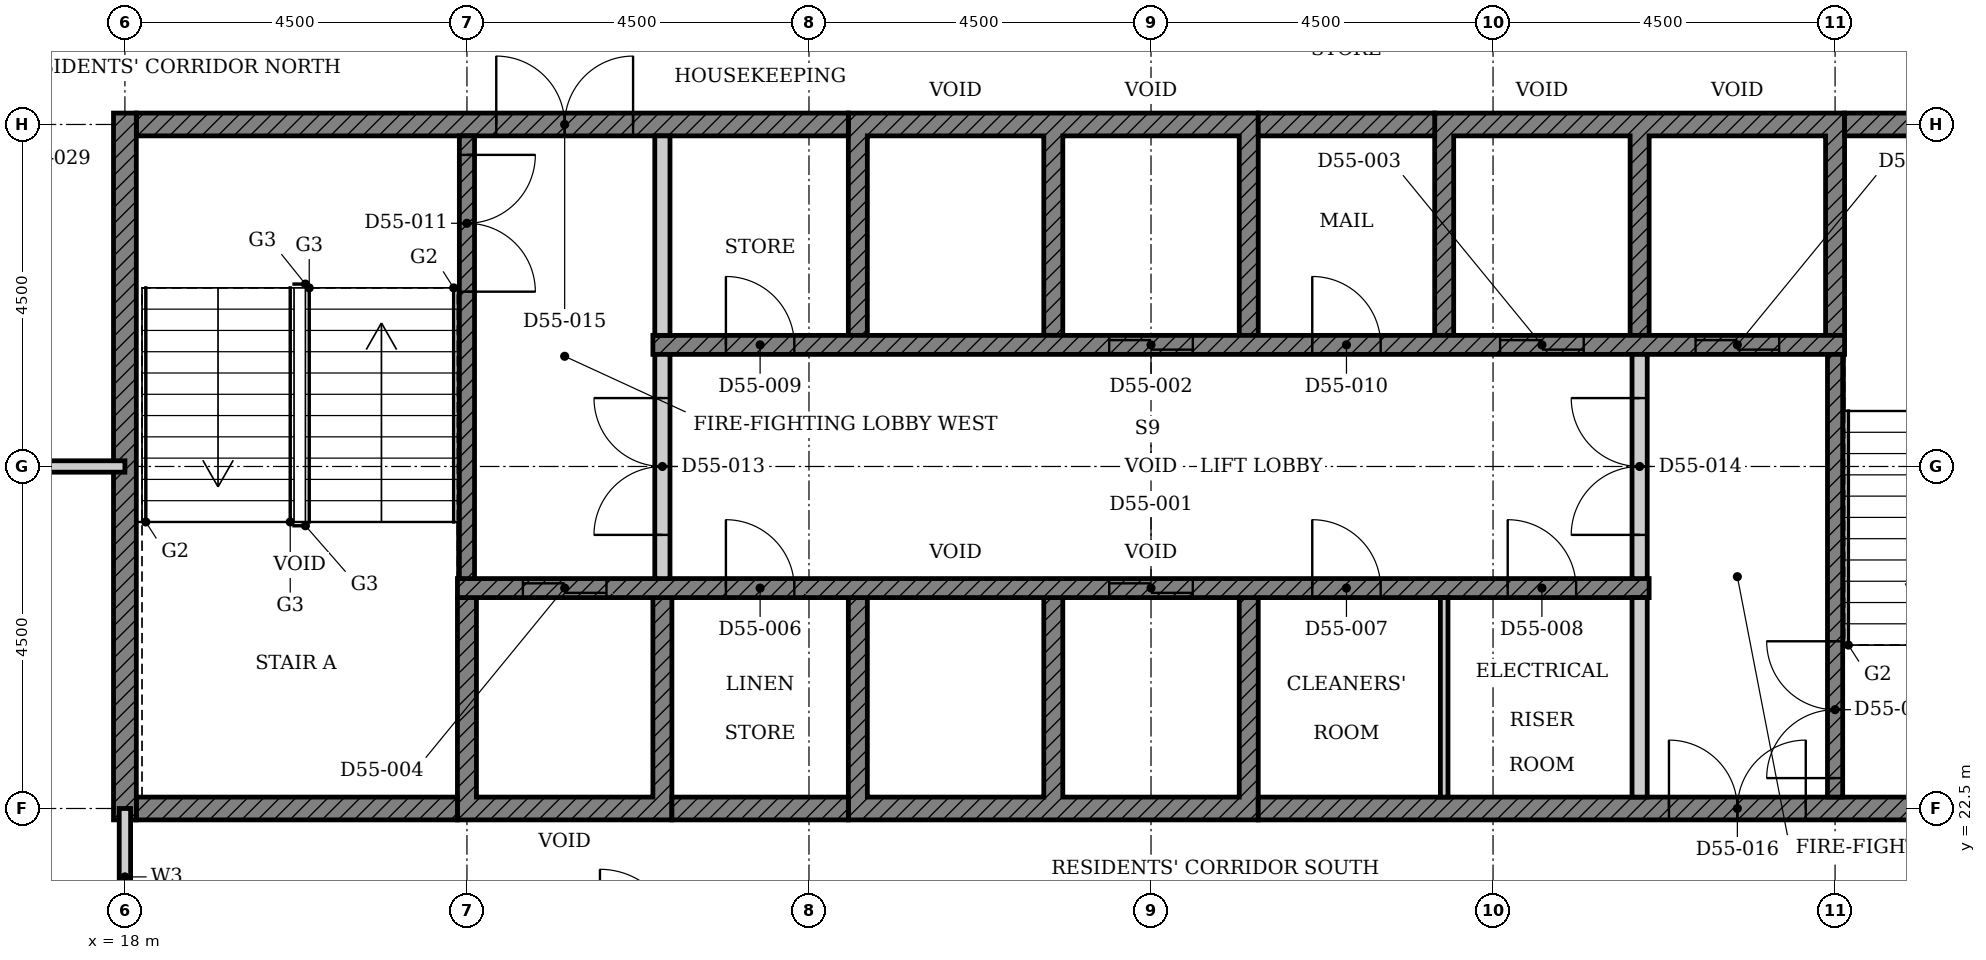
"""IFC4 building model, lengths in metres.
Left out: names, types, materials, properties, quantities, classifications, styles, units other than length and angle.
Written with IfcOpenShell. Run it as: python <this file> out.ifc"""

import sys

from ifc_helpers import new_model, si_unit, direction, frame, frame_2d, origin, place, context, subcontext, project, spatial, polyline, rectangle, outline, extrude, element, fill, save


model = new_model("IFC4")
c1 = context("Model", 3, precision=1e-05, world=origin(), true_north=direction((0.0, 1.0)))
c2 = subcontext(c1, "Body", "Model", "MODEL_VIEW")
j1 = project(units=[si_unit("LENGTHUNIT", "METRE"), si_unit("PLANEANGLEUNIT", "RADIAN")], contexts=[c1])
p1 = place(None, origin())
s1 = spatial("IfcSite", under=j1, at=p1, CompositionType="ELEMENT")
p2 = place(p1, origin())
s2 = spatial("IfcBuilding", under=s1, at=p2, CompositionType="ELEMENT")
p3 = place(p2, frame((0.0, 0.0, 218.3)))
s3 = spatial("IfcBuildingStorey", under=s2, at=p3, CompositionType="ELEMENT", Elevation=218.3)
p4 = place(p3, origin())
e1 = element("IfcWall", 1, at=p4, inside=s3, PredefinedType="SHEAR", context=c2, shape_type="SweptSolid", body=[
    extrude(outline(polyline([(22.375, 22.35), (25.197, 22.35), (25.197, 25.275), (24.947, 25.275), (24.947, 22.65), (22.625, 22.65), (22.625, 25.275), (22.375, 25.275), (22.375, 22.35)])), origin(), (0.0, 0.0, 1.0), 3.4),
])
p5 = place(p3, origin())
e2 = element("IfcWall", 2, at=p5, inside=s3, PredefinedType="SHEAR", context=c2, shape_type="SweptSolid", body=[
    extrude(outline(polyline([(27.518, 22.35), (32.911, 22.35), (32.911, 25.275), (32.661, 25.275), (32.661, 22.65), (30.339, 22.65), (30.339, 25.275), (30.089, 25.275), (30.089, 22.65), (27.768, 22.65), (27.768, 25.275), (27.518, 25.275), (27.518, 22.35)])), origin(), (0.0, 0.0, 1.0), 3.4),
])
p6 = place(p3, origin())
e3 = element("IfcWall", 3, at=p6, inside=s3, PredefinedType="SHEAR", context=c2, shape_type="SweptSolid", body=[
    extrude(outline(polyline([(27.518, 28.725), (27.768, 28.725), (27.768, 31.35), (30.089, 31.35), (30.089, 28.725), (30.339, 28.725), (30.339, 31.35), (32.661, 31.35), (32.661, 28.725), (32.911, 28.725), (32.911, 31.65), (27.518, 31.65), (27.518, 28.725)])), origin(), (0.0, 0.0, 1.0), 3.4),
])
p7 = place(p3, origin())
e4 = element("IfcWall", 4, at=p7, inside=s3, PredefinedType="SHEAR", context=c2, shape_type="SweptSolid", body=[
    extrude(outline(polyline([(35.232, 28.725), (35.482, 28.725), (35.482, 31.35), (37.803, 31.35), (37.803, 28.725), (38.053, 28.725), (38.053, 31.35), (40.375, 31.35), (40.375, 28.725), (40.625, 28.725), (40.625, 31.65), (35.232, 31.65), (35.232, 28.725)])), origin(), (0.0, 0.0, 1.0), 3.4),
])
p8 = place(p3, frame((18.15, 22.5, 0.0), z_axis=(0.0, 0.0, 1.0), x_axis=(1.0, 0.0, 0.0)))
e5 = element("IfcWall", 5, at=p8, inside=s3, PredefinedType="SHEAR", context=c2, shape_type="SweptSolid", body=[
    extrude(rectangle(XDim=4.225, YDim=0.3, at=frame_2d((2.113, 0.0))), origin(), (0.0, 0.0, 1.0), 3.4),
])
p9 = place(p3, frame((25.197, 22.5, 0.0), z_axis=(0.0, 0.0, 1.0), x_axis=(1.0, 0.0, 0.0)))
e6 = element("IfcWall", 6, at=p9, inside=s3, PredefinedType="SHEAR", context=c2, shape_type="SweptSolid", body=[
    extrude(rectangle(XDim=2.321, YDim=0.3, at=frame_2d((1.161, 0.0))), origin(), (0.0, 0.0, 1.0), 3.4),
])
p10 = place(p3, frame((32.911, 22.5, 0.0), z_axis=(0.0, 0.0, 1.0), x_axis=(1.0, 0.0, 0.0)))
e7 = element("IfcWall", 7, at=p10, inside=s3, PredefinedType="SHEAR", context=c2, shape_type="SweptSolid", body=[
    extrude(rectangle(XDim=11.939, YDim=0.3, at=frame_2d((5.97, 0.0))), origin(), (0.0, 0.0, 1.0), 3.4),
])
p11 = place(p10, frame((5.404, 0.0, 0.0)))
e8 = element("IfcOpeningElement", 8, at=p11, cuts=e7, PredefinedType="OPENING", context=c2, shape_type="SweptSolid", body=[
    extrude(rectangle(XDim=1.8, YDim=2.1, at=frame_2d((0.9, 1.05))), frame((0.0, 0.16, 0.0), z_axis=(0.0, -1.0, 0.0), x_axis=(1.0, 0.0, 0.0)), (0.0, 0.0, 1.0), 0.32),
])
p12 = place(p3, frame((18.15, 31.5, 0.0), z_axis=(0.0, 0.0, 1.0), x_axis=(1.0, 0.0, 0.0)))
e9 = element("IfcWall", 9, at=p12, inside=s3, PredefinedType="SHEAR", context=c2, shape_type="SweptSolid", body=[
    extrude(rectangle(XDim=9.368, YDim=0.3, at=frame_2d((4.684, 0.0))), origin(), (0.0, 0.0, 1.0), 3.4),
])
p13 = place(p12, frame((4.736, 0.0, 0.0)))
e10 = element("IfcOpeningElement", 10, at=p13, cuts=e9, PredefinedType="OPENING", context=c2, shape_type="SweptSolid", body=[
    extrude(rectangle(XDim=1.8, YDim=2.1, at=frame_2d((0.9, 1.05))), frame((0.0, 0.16, 0.0), z_axis=(0.0, -1.0, 0.0), x_axis=(1.0, 0.0, 0.0)), (0.0, 0.0, 1.0), 0.32),
])
p14 = place(p3, frame((32.911, 31.5, 0.0), z_axis=(0.0, 0.0, 1.0), x_axis=(1.0, 0.0, 0.0)))
e11 = element("IfcWall", 11, at=p14, inside=s3, PredefinedType="SHEAR", context=c2, shape_type="SweptSolid", body=[
    extrude(rectangle(XDim=2.322, YDim=0.3, at=frame_2d((1.161, 0.0))), origin(), (0.0, 0.0, 1.0), 3.4),
])
p15 = place(p3, frame((40.625, 31.5, 0.0), z_axis=(0.0, 0.0, 1.0), x_axis=(1.0, 0.0, 0.0)))
e12 = element("IfcWall", 12, at=p15, inside=s3, PredefinedType="SHEAR", context=c2, shape_type="SweptSolid", body=[
    extrude(rectangle(XDim=4.225, YDim=0.3, at=frame_2d((2.113, 0.0))), origin(), (0.0, 0.0, 1.0), 3.4),
])
p16 = place(p3, frame((18.0, 22.35, 0.0), z_axis=(0.0, 0.0, 1.0), x_axis=(0.0, 1.0, 0.0)))
e13 = element("IfcWall", 13, at=p16, inside=s3, PredefinedType="SHEAR", context=c2, shape_type="SweptSolid", body=[
    extrude(rectangle(XDim=9.3, YDim=0.3, at=frame_2d((4.65, 0.0))), origin(), (0.0, 0.0, 1.0), 3.4),
])
p17 = place(p3, frame((22.375, 25.4, 0.0), z_axis=(0.0, 0.0, 1.0), x_axis=(1.0, 0.0, 0.0)))
e14 = element("IfcWall", 14, at=p17, inside=s3, PredefinedType="SHEAR", context=c2, shape_type="SweptSolid", body=[
    extrude(rectangle(XDim=15.678, YDim=0.25, at=frame_2d((7.839, 0.0))), origin(), (0.0, 0.0, 1.0), 3.4),
])
p18 = place(p17, frame((8.575, 0.0, 0.0)))
e15 = element("IfcOpeningElement", 15, at=p18, cuts=e14, PredefinedType="OPENING", context=c2, shape_type="SweptSolid", body=[
    extrude(rectangle(XDim=1.1, YDim=2.1, at=frame_2d((0.55, 1.05))), frame((0.0, 0.135, 0.0), z_axis=(0.0, -1.0, 0.0), x_axis=(1.0, 0.0, 0.0)), (0.0, 0.0, 1.0), 0.27),
])
p19 = place(p17, frame((0.861, 0.0, 0.0)))
e16 = element("IfcOpeningElement", 16, at=p19, cuts=e14, PredefinedType="OPENING", context=c2, shape_type="SweptSolid", body=[
    extrude(rectangle(XDim=1.1, YDim=2.1, at=frame_2d((0.55, 1.05))), frame((0.0, 0.135, 0.0), z_axis=(0.0, -1.0, 0.0), x_axis=(1.0, 0.0, 0.0)), (0.0, 0.0, 1.0), 0.27),
])
p20 = place(p17, frame((3.532, 0.0, 0.0)))
e17 = element("IfcOpeningElement", 17, at=p20, cuts=e14, PredefinedType="OPENING", context=c2, shape_type="SweptSolid", body=[
    extrude(rectangle(XDim=0.9, YDim=2.1, at=frame_2d((0.45, 1.05))), frame((0.0, 0.135, 0.0), z_axis=(0.0, -1.0, 0.0), x_axis=(1.0, 0.0, 0.0)), (0.0, 0.0, 1.0), 0.27),
])
p21 = place(p17, frame((11.246, 0.0, 0.0)))
e18 = element("IfcOpeningElement", 18, at=p21, cuts=e14, PredefinedType="OPENING", context=c2, shape_type="SweptSolid", body=[
    extrude(rectangle(XDim=0.9, YDim=2.1, at=frame_2d((0.45, 1.05))), frame((0.0, 0.135, 0.0), z_axis=(0.0, -1.0, 0.0), x_axis=(1.0, 0.0, 0.0)), (0.0, 0.0, 1.0), 0.27),
])
p22 = place(p17, frame((13.818, 0.0, 0.0)))
e19 = element("IfcOpeningElement", 19, at=p22, cuts=e14, PredefinedType="OPENING", context=c2, shape_type="SweptSolid", body=[
    extrude(rectangle(XDim=0.9, YDim=2.1, at=frame_2d((0.45, 1.05))), frame((0.0, 0.135, 0.0), z_axis=(0.0, -1.0, 0.0), x_axis=(1.0, 0.0, 0.0)), (0.0, 0.0, 1.0), 0.27),
])
p23 = place(p3, frame((24.947, 28.6, 0.0), z_axis=(0.0, 0.0, 1.0), x_axis=(1.0, 0.0, 0.0)))
e20 = element("IfcWall", 20, at=p23, inside=s3, PredefinedType="SHEAR", context=c2, shape_type="SweptSolid", body=[
    extrude(rectangle(XDim=15.678, YDim=0.25, at=frame_2d((7.839, 0.0))), origin(), (0.0, 0.0, 1.0), 3.4),
])
p24 = place(p23, frame((6.004, 0.0, 0.0)))
e21 = element("IfcOpeningElement", 21, at=p24, cuts=e20, PredefinedType="OPENING", context=c2, shape_type="SweptSolid", body=[
    extrude(rectangle(XDim=1.1, YDim=2.1, at=frame_2d((0.55, 1.05))), frame((0.0, 0.135, 0.0), z_axis=(0.0, -1.0, 0.0), x_axis=(1.0, 0.0, 0.0)), (0.0, 0.0, 1.0), 0.27),
])
p25 = place(p23, frame((11.146, 0.0, 0.0)))
e22 = element("IfcOpeningElement", 22, at=p25, cuts=e20, PredefinedType="OPENING", context=c2, shape_type="SweptSolid", body=[
    extrude(rectangle(XDim=1.1, YDim=2.1, at=frame_2d((0.55, 1.05))), frame((0.0, 0.135, 0.0), z_axis=(0.0, -1.0, 0.0), x_axis=(1.0, 0.0, 0.0)), (0.0, 0.0, 1.0), 0.27),
])
p26 = place(p23, frame((13.718, 0.0, 0.0)))
e23 = element("IfcOpeningElement", 23, at=p26, cuts=e20, PredefinedType="OPENING", context=c2, shape_type="SweptSolid", body=[
    extrude(rectangle(XDim=1.1, YDim=2.1, at=frame_2d((0.55, 1.05))), frame((0.0, 0.135, 0.0), z_axis=(0.0, -1.0, 0.0), x_axis=(1.0, 0.0, 0.0)), (0.0, 0.0, 1.0), 0.27),
])
p27 = place(p23, frame((0.961, 0.0, 0.0)))
e24 = element("IfcOpeningElement", 24, at=p27, cuts=e20, PredefinedType="OPENING", context=c2, shape_type="SweptSolid", body=[
    extrude(rectangle(XDim=0.9, YDim=2.1, at=frame_2d((0.45, 1.05))), frame((0.0, 0.135, 0.0), z_axis=(0.0, -1.0, 0.0), x_axis=(1.0, 0.0, 0.0)), (0.0, 0.0, 1.0), 0.27),
])
p28 = place(p23, frame((8.675, 0.0, 0.0)))
e25 = element("IfcOpeningElement", 25, at=p28, cuts=e20, PredefinedType="OPENING", context=c2, shape_type="SweptSolid", body=[
    extrude(rectangle(XDim=0.9, YDim=2.1, at=frame_2d((0.45, 1.05))), frame((0.0, 0.135, 0.0), z_axis=(0.0, -1.0, 0.0), x_axis=(1.0, 0.0, 0.0)), (0.0, 0.0, 1.0), 0.27),
])
p29 = place(p3, frame((37.928, 22.65, 0.0), z_axis=(0.0, 0.0, 1.0), x_axis=(0.0, 1.0, 0.0)))
e26 = element("IfcWall", 26, at=p29, inside=s3, PredefinedType="PARTITIONING", context=c2, shape_type="SweptSolid", body=[
    extrude(rectangle(XDim=2.625, YDim=0.2, at=frame_2d((1.312, 0.0))), origin(), (0.0, 0.0, 1.0), 3.4),
])
p30 = place(p3, frame((35.357, 22.65, 0.0), z_axis=(0.0, 0.0, 1.0), x_axis=(0.0, 1.0, 0.0)))
e27 = element("IfcWall", 27, at=p30, inside=s3, PredefinedType="PARTITIONING", context=c2, shape_type="SweptSolid", body=[
    extrude(rectangle(XDim=2.625, YDim=0.1, at=frame_2d((1.312, 0.0))), origin(), (0.0, 0.0, 1.0), 3.4),
])
p31 = place(p3, frame((25.072, 28.725, 0.0), z_axis=(0.0, 0.0, 1.0), x_axis=(0.0, 1.0, 0.0)))
e28 = element("IfcWall", 28, at=p31, inside=s3, PredefinedType="PARTITIONING", context=c2, shape_type="SweptSolid", body=[
    extrude(rectangle(XDim=2.625, YDim=0.2, at=frame_2d((1.312, 0.0))), origin(), (0.0, 0.0, 1.0), 3.4),
])
p32 = place(p3, frame((22.5, 31.35, 0.0), z_axis=(0.0, 0.0, 1.0), x_axis=(0.0, -1.0, 0.0)))
e29 = element("IfcWall", 29, at=p32, inside=s3, PredefinedType="SHEAR", context=c2, shape_type="SweptSolid", body=[
    extrude(rectangle(XDim=5.825, YDim=0.2, at=frame_2d((2.913, 0.0))), origin(), (0.0, 0.0, 1.0), 3.4),
])
p33 = place(p32, frame((0.25, 0.0, 0.0)))
e30 = element("IfcOpeningElement", 30, at=p33, cuts=e29, PredefinedType="OPENING", context=c2, shape_type="SweptSolid", body=[
    extrude(rectangle(XDim=1.8, YDim=2.1, at=frame_2d((0.9, 1.05))), frame((0.0, 0.11, 0.0), z_axis=(0.0, -1.0, 0.0), x_axis=(1.0, 0.0, 0.0)), (0.0, 0.0, 1.0), 0.22),
])
p34 = place(p3, frame((40.5, 22.65, 0.0), z_axis=(0.0, 0.0, 1.0), x_axis=(0.0, 1.0, 0.0)))
e31 = element("IfcWall", 31, at=p34, inside=s3, PredefinedType="SHEAR", context=c2, shape_type="SweptSolid", body=[
    extrude(rectangle(XDim=5.825, YDim=0.2, at=frame_2d((2.913, 0.0))), origin(), (0.0, 0.0, 1.0), 3.4),
])
p35 = place(p34, frame((0.25, 0.0, 0.0)))
e32 = element("IfcOpeningElement", 32, at=p35, cuts=e31, PredefinedType="OPENING", context=c2, shape_type="SweptSolid", body=[
    extrude(rectangle(XDim=1.8, YDim=2.1, at=frame_2d((0.9, 1.05))), frame((0.0, 0.11, 0.0), z_axis=(0.0, -1.0, 0.0), x_axis=(1.0, 0.0, 0.0)), (0.0, 0.0, 1.0), 0.22),
])
p36 = place(p3, frame((25.072, 25.525, 0.0), z_axis=(0.0, 0.0, 1.0), x_axis=(0.0, 1.0, 0.0)))
e33 = element("IfcWall", 33, at=p36, inside=s3, PredefinedType="PARTITIONING", context=c2, shape_type="SweptSolid", body=[
    extrude(rectangle(XDim=2.95, YDim=0.2, at=frame_2d((1.475, 0.0))), origin(), (0.0, 0.0, 1.0), 3.4),
])
p37 = place(p36, frame((0.575, 0.0, 0.0)))
e34 = element("IfcOpeningElement", 34, at=p37, cuts=e33, PredefinedType="OPENING", context=c2, shape_type="SweptSolid", body=[
    extrude(rectangle(XDim=1.8, YDim=2.1, at=frame_2d((0.9, 1.05))), frame((0.0, 0.11, 0.0), z_axis=(0.0, -1.0, 0.0), x_axis=(1.0, 0.0, 0.0)), (0.0, 0.0, 1.0), 0.22),
])
p38 = place(p3, frame((37.928, 25.525, 0.0), z_axis=(0.0, 0.0, 1.0), x_axis=(0.0, 1.0, 0.0)))
e35 = element("IfcWall", 35, at=p38, inside=s3, PredefinedType="PARTITIONING", context=c2, shape_type="SweptSolid", body=[
    extrude(rectangle(XDim=2.95, YDim=0.2, at=frame_2d((1.475, 0.0))), origin(), (0.0, 0.0, 1.0), 3.4),
])
p39 = place(p38, frame((0.575, 0.0, 0.0)))
e36 = element("IfcOpeningElement", 36, at=p39, cuts=e35, PredefinedType="OPENING", context=c2, shape_type="SweptSolid", body=[
    extrude(rectangle(XDim=1.8, YDim=2.1, at=frame_2d((0.9, 1.05))), frame((0.0, 0.11, 0.0), z_axis=(0.0, -1.0, 0.0), x_axis=(1.0, 0.0, 0.0)), (0.0, 0.0, 1.0), 0.22),
])
p40 = place(p3, frame((4.5, 27.0, 0.0), z_axis=(0.0, 0.0, 1.0), x_axis=(1.0, 0.0, 0.0)))
e37 = element("IfcWall", 37, at=p40, inside=s3, PredefinedType="PARTITIONING", context=c2, shape_type="SweptSolid", body=[
    extrude(rectangle(XDim=13.5, YDim=0.15, at=frame_2d((6.75, 0.0))), origin(), (0.0, 0.0, 1.0), 2.68),
])
p41 = place(p40, frame((5.35, 0.0, 0.0)))
e38 = element("IfcOpeningElement", 38, at=p41, cuts=e37, PredefinedType="OPENING", context=c2, shape_type="SweptSolid", body=[
    extrude(rectangle(XDim=1.0, YDim=2.1, at=frame_2d((0.5, 1.05))), frame((0.0, 0.085, 0.0), z_axis=(0.0, -1.0, 0.0), x_axis=(1.0, 0.0, 0.0)), (0.0, 0.0, 1.0), 0.17),
])
p42 = place(p3, frame((18.0, 20.7, 0.0), z_axis=(0.0, 0.0, 1.0), x_axis=(0.0, 1.0, 0.0)))
e39 = element("IfcWall", 39, at=p42, inside=s3, PredefinedType="PARTITIONING", context=c2, shape_type="SweptSolid", body=[
    extrude(rectangle(XDim=1.8, YDim=0.15, at=frame_2d((0.9, 0.0))), origin(), (0.0, 0.0, 1.0), 3.4),
])
p43 = place(p18, origin())
e40 = element("IfcDoor", 40, at=p43, inside=s3, OperationType="DOUBLE_DOOR_SLIDING", PredefinedType="DOOR", context=c2, shape_type="SweptSolid", body=[
    extrude(rectangle(XDim=1.1, YDim=2.1, at=frame_2d((0.55, 1.05))), frame((0.0, 0.025, 0.0), z_axis=(0.0, -1.0, 0.0), x_axis=(1.0, 0.0, 0.0)), (0.0, 0.0, 1.0), 0.05),
])
fill(e15, e40)
p44 = place(p24, origin())
e41 = element("IfcDoor", 41, at=p44, inside=s3, OperationType="DOUBLE_DOOR_SLIDING", PredefinedType="DOOR", context=c2, shape_type="SweptSolid", body=[
    extrude(rectangle(XDim=1.1, YDim=2.1, at=frame_2d((0.55, 1.05))), frame((0.0, 0.025, 0.0), z_axis=(0.0, -1.0, 0.0), x_axis=(1.0, 0.0, 0.0)), (0.0, 0.0, 1.0), 0.05),
])
fill(e21, e41)
p45 = place(p25, origin())
e42 = element("IfcDoor", 42, at=p45, inside=s3, OperationType="DOUBLE_DOOR_SLIDING", PredefinedType="DOOR", context=c2, shape_type="SweptSolid", body=[
    extrude(rectangle(XDim=1.1, YDim=2.1, at=frame_2d((0.55, 1.05))), frame((0.0, 0.025, 0.0), z_axis=(0.0, -1.0, 0.0), x_axis=(1.0, 0.0, 0.0)), (0.0, 0.0, 1.0), 0.05),
])
fill(e22, e42)
p46 = place(p19, origin())
e43 = element("IfcDoor", 43, at=p46, inside=s3, OperationType="DOUBLE_DOOR_SLIDING", PredefinedType="DOOR", context=c2, shape_type="SweptSolid", body=[
    extrude(rectangle(XDim=1.1, YDim=2.1, at=frame_2d((0.55, 1.05))), frame((0.0, 0.025, 0.0), z_axis=(0.0, -1.0, 0.0), x_axis=(1.0, 0.0, 0.0)), (0.0, 0.0, 1.0), 0.05),
])
fill(e16, e43)
p47 = place(p26, origin())
e44 = element("IfcDoor", 44, at=p47, inside=s3, OperationType="DOUBLE_DOOR_SLIDING", PredefinedType="DOOR", context=c2, shape_type="SweptSolid", body=[
    extrude(rectangle(XDim=1.1, YDim=2.1, at=frame_2d((0.55, 1.05))), frame((0.0, 0.025, 0.0), z_axis=(0.0, -1.0, 0.0), x_axis=(1.0, 0.0, 0.0)), (0.0, 0.0, 1.0), 0.05),
])
fill(e23, e44)
p48 = place(p20, origin())
e45 = element("IfcDoor", 45, at=p48, inside=s3, OperationType="SINGLE_SWING_LEFT", PredefinedType="DOOR", context=c2, shape_type="SweptSolid", body=[
    extrude(rectangle(XDim=0.9, YDim=2.1, at=frame_2d((0.45, 1.05))), frame((0.0, 0.025, 0.0), z_axis=(0.0, -1.0, 0.0), x_axis=(1.0, 0.0, 0.0)), (0.0, 0.0, 1.0), 0.05),
])
fill(e17, e45)
p49 = place(p21, origin())
e46 = element("IfcDoor", 46, at=p49, inside=s3, OperationType="SINGLE_SWING_LEFT", PredefinedType="DOOR", context=c2, shape_type="SweptSolid", body=[
    extrude(rectangle(XDim=0.9, YDim=2.1, at=frame_2d((0.45, 1.05))), frame((0.0, 0.025, 0.0), z_axis=(0.0, -1.0, 0.0), x_axis=(1.0, 0.0, 0.0)), (0.0, 0.0, 1.0), 0.05),
])
fill(e18, e46)
p50 = place(p22, origin())
e47 = element("IfcDoor", 47, at=p50, inside=s3, OperationType="SINGLE_SWING_LEFT", PredefinedType="DOOR", context=c2, shape_type="SweptSolid", body=[
    extrude(rectangle(XDim=0.9, YDim=2.1, at=frame_2d((0.45, 1.05))), frame((0.0, 0.025, 0.0), z_axis=(0.0, -1.0, 0.0), x_axis=(1.0, 0.0, 0.0)), (0.0, 0.0, 1.0), 0.05),
])
fill(e19, e47)
p51 = place(p27, origin())
e48 = element("IfcDoor", 48, at=p51, inside=s3, OperationType="SINGLE_SWING_LEFT", PredefinedType="DOOR", context=c2, shape_type="SweptSolid", body=[
    extrude(rectangle(XDim=0.9, YDim=2.1, at=frame_2d((0.45, 1.05))), frame((0.0, 0.025, 0.0), z_axis=(0.0, -1.0, 0.0), x_axis=(1.0, 0.0, 0.0)), (0.0, 0.0, 1.0), 0.05),
])
fill(e24, e48)
p52 = place(p28, origin())
e49 = element("IfcDoor", 49, at=p52, inside=s3, OperationType="SINGLE_SWING_LEFT", PredefinedType="DOOR", context=c2, shape_type="SweptSolid", body=[
    extrude(rectangle(XDim=0.9, YDim=2.1, at=frame_2d((0.45, 1.05))), frame((0.0, 0.025, 0.0), z_axis=(0.0, -1.0, 0.0), x_axis=(1.0, 0.0, 0.0)), (0.0, 0.0, 1.0), 0.05),
])
fill(e25, e49)
p53 = place(p33, origin())
e50 = element("IfcDoor", 50, at=p53, inside=s3, OperationType="DOUBLE_DOOR_SINGLE_SWING", PredefinedType="DOOR", context=c2, shape_type="SweptSolid", body=[
    extrude(rectangle(XDim=1.8, YDim=2.1, at=frame_2d((0.9, 1.05))), frame((0.0, 0.025, 0.0), z_axis=(0.0, -1.0, 0.0), x_axis=(1.0, 0.0, 0.0)), (0.0, 0.0, 1.0), 0.05),
])
fill(e30, e50)
p54 = place(p35, origin())
e51 = element("IfcDoor", 51, at=p54, inside=s3, OperationType="DOUBLE_DOOR_SINGLE_SWING", PredefinedType="DOOR", context=c2, shape_type="SweptSolid", body=[
    extrude(rectangle(XDim=1.8, YDim=2.1, at=frame_2d((0.9, 1.05))), frame((0.0, 0.025, 0.0), z_axis=(0.0, -1.0, 0.0), x_axis=(1.0, 0.0, 0.0)), (0.0, 0.0, 1.0), 0.05),
])
fill(e32, e51)
p55 = place(p37, origin())
e52 = element("IfcDoor", 52, at=p55, inside=s3, OperationType="DOUBLE_DOOR_SINGLE_SWING", PredefinedType="DOOR", context=c2, shape_type="SweptSolid", body=[
    extrude(rectangle(XDim=1.8, YDim=2.1, at=frame_2d((0.9, 1.05))), frame((0.0, 0.025, 0.0), z_axis=(0.0, -1.0, 0.0), x_axis=(1.0, 0.0, 0.0)), (0.0, 0.0, 1.0), 0.05),
])
fill(e34, e52)
p56 = place(p39, origin())
e53 = element("IfcDoor", 53, at=p56, inside=s3, OperationType="DOUBLE_DOOR_SINGLE_SWING", PredefinedType="DOOR", context=c2, shape_type="SweptSolid", body=[
    extrude(rectangle(XDim=1.8, YDim=2.1, at=frame_2d((0.9, 1.05))), frame((0.0, 0.025, 0.0), z_axis=(0.0, -1.0, 0.0), x_axis=(1.0, 0.0, 0.0)), (0.0, 0.0, 1.0), 0.05),
])
fill(e36, e53)
p57 = place(p13, origin())
e54 = element("IfcDoor", 54, at=p57, inside=s3, OperationType="DOUBLE_DOOR_SINGLE_SWING", PredefinedType="DOOR", context=c2, shape_type="SweptSolid", body=[
    extrude(rectangle(XDim=1.8, YDim=2.1, at=frame_2d((0.9, 1.05))), frame((0.0, 0.025, 0.0), z_axis=(0.0, -1.0, 0.0), x_axis=(1.0, 0.0, 0.0)), (0.0, 0.0, 1.0), 0.05),
])
fill(e10, e54)
p58 = place(p11, origin())
e55 = element("IfcDoor", 55, at=p58, inside=s3, OperationType="DOUBLE_DOOR_SINGLE_SWING", PredefinedType="DOOR", context=c2, shape_type="SweptSolid", body=[
    extrude(rectangle(XDim=1.8, YDim=2.1, at=frame_2d((0.9, 1.05))), frame((0.0, 0.025, 0.0), z_axis=(0.0, -1.0, 0.0), x_axis=(1.0, 0.0, 0.0)), (0.0, 0.0, 1.0), 0.05),
])
fill(e8, e55)
save(model, sys.argv[1])
